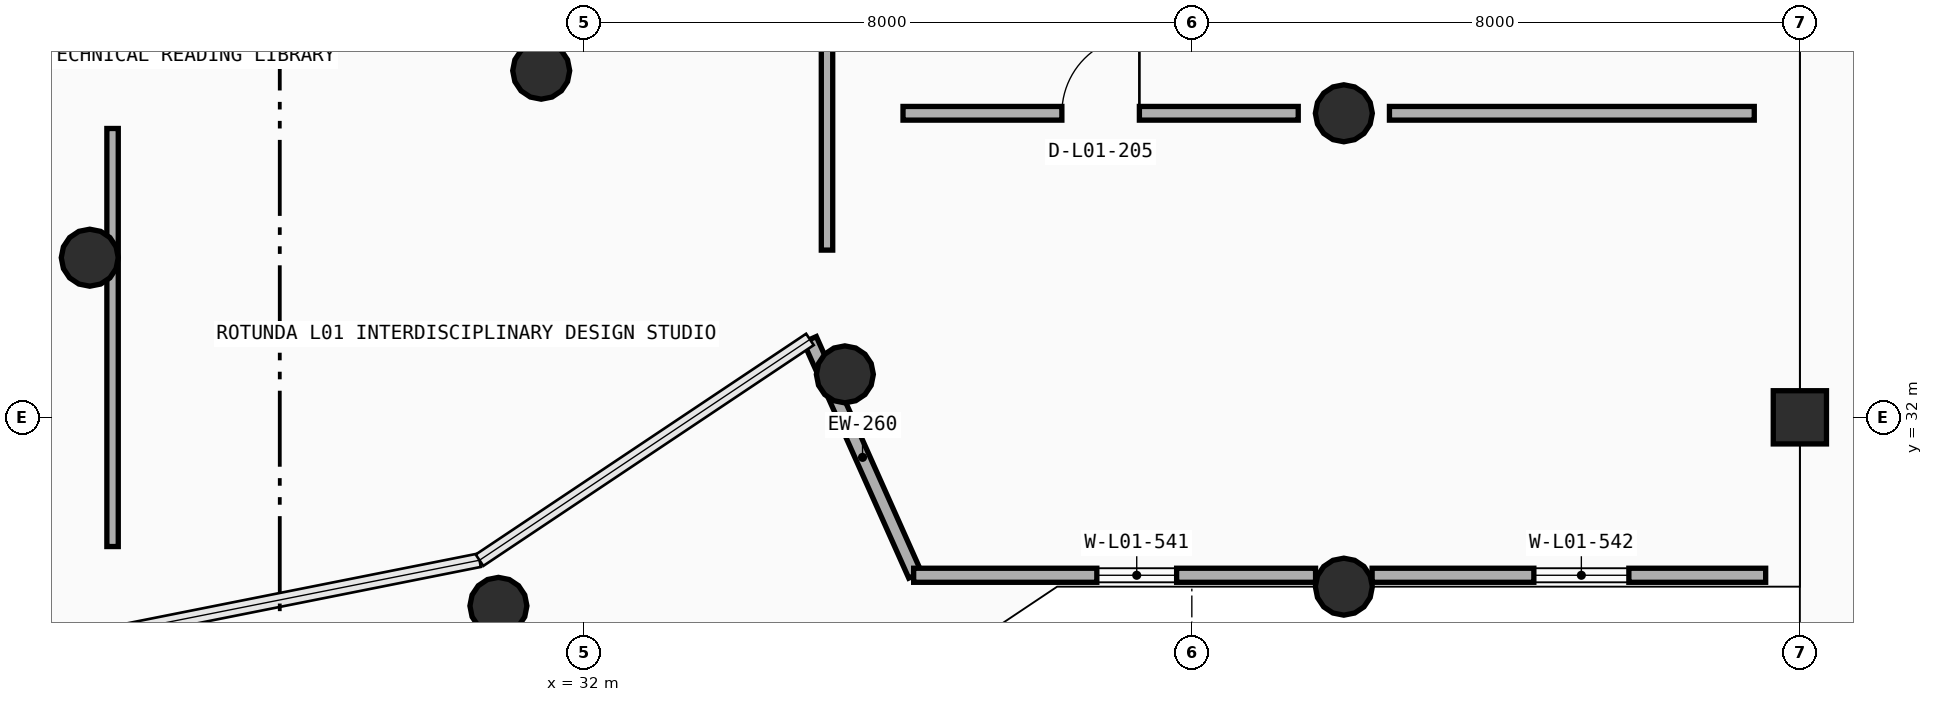
"""IFC4 building model, lengths in metres.
Left out: names, types, materials, properties, quantities, classifications, styles, units other than length and angle.
Written with IfcOpenShell. Run it as: python <this file> out.ifc"""

import sys

from ifc_helpers import new_model, si_unit, direction, frame, frame_2d, origin, origin_2d, place, context, subcontext, project, spatial, rectangle, circle, extrude, element, fill, save


model = new_model("IFC4")
c1 = context("Model", 3, precision=1e-05, world=origin(), true_north=direction((0.0, 1.0)))
c2 = subcontext(c1, "Body", "Model", "MODEL_VIEW")
j1 = project(units=[si_unit("LENGTHUNIT", "METRE"), si_unit("PLANEANGLEUNIT", "RADIAN")], contexts=[c1])
p1 = place(None, origin())
s1 = spatial("IfcSite", under=j1, at=p1, CompositionType="ELEMENT")
p2 = place(p1, origin())
s2 = spatial("IfcBuilding", under=s1, at=p2, CompositionType="ELEMENT")
p3 = place(p2, origin())
s3 = spatial("IfcBuildingStorey", under=s2, at=p3, CompositionType="ELEMENT", Elevation=0.0)
for number, where, z_axis, x_axis in (
    (1, (30.877, 29.52, 0.0), (0.0, 0.0, 1.0), (1.0, 0.0, 0.0)),
    (2, (42.0, 29.772, 0.0), (0.0, 0.0, 1.0), (1.0, 0.0, 0.0)),
):
    element("IfcColumn", number, at=place(p3, frame(where, z_axis=z_axis, x_axis=x_axis)), inside=s3, PredefinedType="COLUMN", context=c2, shape_type="SweptSolid", body=[
        extrude(circle(Radius=0.375, at=origin_2d()), origin(), (0.0, 0.0, 1.0), 4.8),
    ])
p4 = place(p3, frame((48.0, 32.0, 0.0), z_axis=(0.0, 0.0, 1.0), x_axis=(1.0, 0.0, 0.0)))
e3 = element("IfcColumn", 3, at=p4, inside=s3, PredefinedType="COLUMN", context=c2, shape_type="SweptSolid", body=[
    extrude(rectangle(XDim=0.7, YDim=0.7, at=origin_2d()), origin(), (0.0, 0.0, 1.0), 4.8),
])
for number, where, z_axis, x_axis in (
    (4, (35.435, 32.565, 0.0), (0.0, 0.0, 1.0), (1.0, 0.0, 0.0)),
    (5, (25.5, 34.1, 0.0), (0.0, 0.0, 1.0), (1.0, 0.0, 0.0)),
    (6, (42.0, 36.0, 0.0), (0.0, 0.0, 1.0), (1.0, 0.0, 0.0)),
    (7, (31.44, 36.56, 0.0), (0.0, 0.0, 1.0), (1.0, 0.0, 0.0)),
):
    element("IfcColumn", number, at=place(p3, frame(where, z_axis=z_axis, x_axis=x_axis)), inside=s3, PredefinedType="COLUMN", context=c2, shape_type="SweptSolid", body=[
        extrude(circle(Radius=0.375, at=origin_2d()), origin(), (0.0, 0.0, 1.0), 4.8),
    ])
p5 = place(p3, frame((32.342, 25.981, 0.0), z_axis=(0.0, 0.0, 1.0), x_axis=(0.831468390799, 0.555572061125, 0.0)))
e8 = element("IfcWall", 8, at=p5, inside=s3, PredefinedType="PARAPET", context=c2, shape_type="SweptSolid", body=[
    extrude(rectangle(XDim=6.977, YDim=0.2, at=frame_2d((3.488, 0.0))), origin(), (0.0, 0.0, 1.0), 1.15),
])
p6 = place(p3, frame((36.36, 29.922, 0.0), z_axis=(0.0, 0.0, 1.0), x_axis=(-0.40761125598, 0.913155553013, 0.0)))
e9 = element("IfcWall", 9, at=p6, inside=s3, PredefinedType="STANDARD", context=c2, shape_type="SweptSolid", body=[
    extrude(rectangle(XDim=3.398, YDim=0.185, at=frame_2d((1.699, 0.0))), origin(), (0.0, 0.0, 1.0), 3.95),
])
p7 = place(p3, frame((41.628, 29.922, 0.0), z_axis=(0.0, 0.0, 1.0), x_axis=(-1.0, 0.0, 0.0)))
e10 = element("IfcWall", 10, at=p7, inside=s3, PredefinedType="STANDARD", context=c2, shape_type="SweptSolid", body=[
    extrude(rectangle(XDim=5.288, YDim=0.185, at=frame_2d((2.644, 0.0))), origin(), (0.0, 0.0, 1.0), 3.925),
])
p8 = place(p7, frame((1.828, 0.0, 0.9)))
e11 = element("IfcOpeningElement", 11, at=p8, cuts=e10, PredefinedType="OPENING", context=c2, shape_type="SweptSolid", body=[
    extrude(rectangle(XDim=1.05, YDim=1.25, at=frame_2d((0.525, 0.625))), frame((0.0, 0.103, 0.0), z_axis=(0.0, -1.0, 0.0), x_axis=(1.0, 0.0, 0.0)), (0.0, 0.0, 1.0), 0.205),
])
p9 = place(p3, frame((47.55, 29.922, 0.0), z_axis=(0.0, 0.0, 1.0), x_axis=(-1.0, 0.0, 0.0)))
e12 = element("IfcWall", 12, at=p9, inside=s3, PredefinedType="STANDARD", context=c2, shape_type="SweptSolid", body=[
    extrude(rectangle(XDim=5.178, YDim=0.185, at=frame_2d((2.589, 0.0))), origin(), (0.0, 0.0, 1.0), 3.95),
])
p10 = place(p9, frame((1.8, 0.0, 0.9)))
e13 = element("IfcOpeningElement", 13, at=p10, cuts=e12, PredefinedType="OPENING", context=c2, shape_type="SweptSolid", body=[
    extrude(rectangle(XDim=1.25, YDim=1.25, at=frame_2d((0.625, 0.625))), frame((0.0, 0.103, 0.0), z_axis=(0.0, -1.0, 0.0), x_axis=(1.0, 0.0, 0.0)), (0.0, 0.0, 1.0), 0.205),
])
p11 = place(p3, frame((42.6, 36.0, 0.0), z_axis=(0.0, 0.0, 1.0), x_axis=(1.0, 0.0, 0.0)))
e14 = element("IfcWall", 14, at=p11, inside=s3, PredefinedType="PARTITIONING", context=c2, shape_type="SweptSolid", body=[
    extrude(rectangle(XDim=4.8, YDim=0.18, at=frame_2d((2.4, 0.0))), origin(), (0.0, 0.0, 1.0), 3.9),
])
p12 = place(p3, frame((25.8, 30.3, 0.0), z_axis=(0.0, 0.0, 1.0), x_axis=(0.0, 1.0, 0.0)))
e15 = element("IfcWall", 15, at=p12, inside=s3, PredefinedType="PARTITIONING", context=c2, shape_type="SweptSolid", body=[
    extrude(rectangle(XDim=5.5, YDim=0.15, at=frame_2d((2.75, 0.0))), origin(), (0.0, 0.0, 1.0), 3.775),
])
p13 = place(p3, frame((36.2, 36.0, 0.0), z_axis=(0.0, 0.0, 1.0), x_axis=(1.0, 0.0, 0.0)))
e16 = element("IfcWall", 16, at=p13, inside=s3, PredefinedType="PARTITIONING", context=c2, shape_type="SweptSolid", body=[
    extrude(rectangle(XDim=5.2, YDim=0.18, at=frame_2d((2.6, 0.0))), origin(), (0.0, 0.0, 1.0), 3.9),
])
p14 = place(p13, frame((2.09, 0.0, 0.0)))
e17 = element("IfcOpeningElement", 17, at=p14, cuts=e16, PredefinedType="OPENING", context=c2, shape_type="SweptSolid", body=[
    extrude(rectangle(XDim=1.02, YDim=2.1, at=frame_2d((0.51, 1.05))), frame((0.0, 0.1, 0.0), z_axis=(0.0, -1.0, 0.0), x_axis=(1.0, 0.0, 0.0)), (0.0, 0.0, 1.0), 0.2),
])
p15 = place(p3, frame((35.2, 34.2, 0.0), z_axis=(0.0, 0.0, 1.0), x_axis=(0.0, 1.0, 0.0)))
e18 = element("IfcWall", 18, at=p15, inside=s3, PredefinedType="PARTITIONING", context=c2, shape_type="SweptSolid", body=[
    extrude(rectangle(XDim=6.4, YDim=0.15, at=frame_2d((3.2, 0.0))), origin(), (0.0, 0.0, 1.0), 3.9),
])
p16 = place(p8, origin())
e19 = element("IfcWindow", 19, at=p16, inside=s3, PartitioningType="SINGLE_PANEL", PredefinedType="WINDOW", context=c2, shape_type="SweptSolid", body=[
    extrude(rectangle(XDim=1.05, YDim=1.25, at=frame_2d((0.525, 0.625))), frame((0.0, 0.03, 0.0), z_axis=(0.0, -1.0, 0.0), x_axis=(1.0, 0.0, 0.0)), (0.0, 0.0, 1.0), 0.06),
])
fill(e11, e19)
p17 = place(p10, origin())
e20 = element("IfcWindow", 20, at=p17, inside=s3, PartitioningType="SINGLE_PANEL", PredefinedType="WINDOW", context=c2, shape_type="SweptSolid", body=[
    extrude(rectangle(XDim=1.25, YDim=1.25, at=frame_2d((0.625, 0.625))), frame((0.0, 0.03, 0.0), z_axis=(0.0, -1.0, 0.0), x_axis=(1.0, 0.0, 0.0)), (0.0, 0.0, 1.0), 0.06),
])
fill(e13, e20)
p18 = place(p14, origin())
e21 = element("IfcDoor", 21, at=p18, inside=s3, OperationType="SINGLE_SWING_RIGHT", PredefinedType="DOOR", context=c2, shape_type="SweptSolid", body=[
    extrude(rectangle(XDim=1.02, YDim=2.1, at=frame_2d((0.51, 1.05))), frame((0.0, 0.025, 0.0), z_axis=(0.0, -1.0, 0.0), x_axis=(1.0, 0.0, 0.0)), (0.0, 0.0, 1.0), 0.05),
])
fill(e17, e21)
save(model, sys.argv[1])
